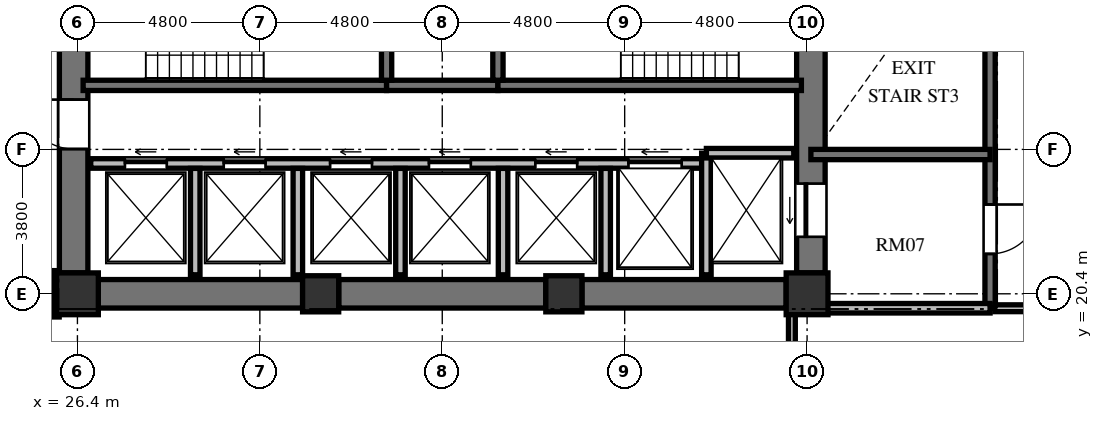
"""IFC4 building model, lengths in metres.
Left out: names, types, materials, properties, quantities, classifications, styles, units other than length and angle.
Written with IfcOpenShell. Run it as: python <this file> out.ifc"""

import sys

from ifc_helpers import new_model, si_unit, direction, frame, frame_2d, origin, origin_2d, place, context, subcontext, project, spatial, rectangle, extrude, element, fill, save


model = new_model("IFC4")
c1 = context("Model", 3, precision=1e-05, world=origin(), true_north=direction((0.0, 1.0)))
c2 = subcontext(c1, "Body", "Model", "MODEL_VIEW")
j1 = project(units=[si_unit("LENGTHUNIT", "METRE"), si_unit("PLANEANGLEUNIT", "RADIAN")], contexts=[c1])
p1 = place(None, origin())
s1 = spatial("IfcSite", under=j1, at=p1, CompositionType="ELEMENT")
p2 = place(p1, origin())
s2 = spatial("IfcBuilding", under=s1, at=p2, CompositionType="ELEMENT")
p3 = place(p2, frame((0.0, 0.0, 118.224)))
s3 = spatial("IfcBuildingStorey", under=s2, at=p3, CompositionType="ELEMENT", Elevation=118.224)
p4 = place(p3, frame((26.4, 20.4, 0.0), z_axis=(0.0, 0.0, 1.0), x_axis=(1.0, 0.0, 0.0)))
e1 = element("IfcColumn", 1, at=p4, inside=s3, PredefinedType="COLUMN", context=c2, shape_type="SweptSolid", body=[
    extrude(rectangle(XDim=1.1, YDim=1.1, at=origin_2d()), origin(), (0.0, 0.0, 1.0), 3.648),
])
for number, where, z_axis, x_axis in (
    (2, (32.8, 20.4, 0.0), (0.0, 0.0, 1.0), (1.0, 0.0, 0.0)),
    (3, (39.2, 20.4, 0.0), (0.0, 0.0, 1.0), (1.0, 0.0, 0.0)),
):
    element("IfcColumn", number, at=place(p3, frame(where, z_axis=z_axis, x_axis=x_axis)), inside=s3, PredefinedType="COLUMN", context=c2, shape_type="SweptSolid", body=[
        extrude(rectangle(XDim=0.95, YDim=0.95, at=origin_2d()), origin(), (0.0, 0.0, 1.0), 3.648),
    ])
p5 = place(p3, frame((45.6, 20.4, 0.0), z_axis=(0.0, 0.0, 1.0), x_axis=(1.0, 0.0, 0.0)))
e4 = element("IfcColumn", 4, at=p5, inside=s3, PredefinedType="COLUMN", context=c2, shape_type="SweptSolid", body=[
    extrude(rectangle(XDim=1.1, YDim=1.1, at=origin_2d()), origin(), (0.0, 0.0, 1.0), 3.648),
])
p6 = place(p3, frame((26.3, 20.95, 0.0), z_axis=(0.0, 0.0, 1.0), x_axis=(0.0, 1.0, 0.0)))
e5 = element("IfcWall", 5, at=p6, inside=s3, PredefinedType="SHEAR", context=c2, shape_type="SweptSolid", body=[
    extrude(rectangle(XDim=14.1, YDim=0.75, at=frame_2d((7.05, 0.0))), origin(), (0.0, 0.0, 1.0), 3.648),
])
p7 = place(p6, frame((6.5, 0.0, 0.0)))
e6 = element("IfcOpeningElement", 6, at=p7, cuts=e5, PredefinedType="OPENING", context=c2, shape_type="SweptSolid", body=[
    extrude(rectangle(XDim=1.2, YDim=2.15, at=frame_2d((0.6, 1.075))), frame((0.0, 0.385, 0.0), z_axis=(0.0, -1.0, 0.0), x_axis=(1.0, 0.0, 0.0)), (0.0, 0.0, 1.0), 0.77),
])
p8 = place(p6, frame((9.6, 0.0, 0.0)))
e7 = element("IfcOpeningElement", 7, at=p8, cuts=e5, PredefinedType="OPENING", context=c2, shape_type="SweptSolid", body=[
    extrude(rectangle(XDim=1.3, YDim=2.2, at=frame_2d((0.65, 1.1))), frame((0.0, 0.385, 0.0), z_axis=(0.0, -1.0, 0.0), x_axis=(1.0, 0.0, 0.0)), (0.0, 0.0, 1.0), 0.77),
])
p9 = place(p6, frame((3.26, 0.0, 0.0)))
e8 = element("IfcOpeningElement", 8, at=p9, cuts=e5, PredefinedType="OPENING", context=c2, shape_type="SweptSolid", body=[
    extrude(rectangle(XDim=1.3, YDim=2.2, at=frame_2d((0.65, 1.1))), frame((0.0, 0.385, 0.0), z_axis=(0.0, -1.0, 0.0), x_axis=(1.0, 0.0, 0.0)), (0.0, 0.0, 1.0), 0.77),
])
p10 = place(p3, frame((45.7, 20.95, 0.0), z_axis=(0.0, 0.0, 1.0), x_axis=(0.0, 1.0, 0.0)))
e9 = element("IfcWall", 9, at=p10, inside=s3, PredefinedType="SHEAR", context=c2, shape_type="SweptSolid", body=[
    extrude(rectangle(XDim=14.1, YDim=0.75, at=frame_2d((7.05, 0.0))), origin(), (0.0, 0.0, 1.0), 3.648),
])
p11 = place(p10, frame((11.75, 0.0, 0.0)))
e10 = element("IfcOpeningElement", 10, at=p11, cuts=e9, PredefinedType="OPENING", context=c2, shape_type="SweptSolid", body=[
    extrude(rectangle(XDim=1.4, YDim=2.3, at=frame_2d((0.7, 1.15))), frame((0.0, 0.385, 0.0), z_axis=(0.0, -1.0, 0.0), x_axis=(1.0, 0.0, 0.0)), (0.0, 0.0, 1.0), 0.77),
])
p12 = place(p10, frame((0.95, 0.0, 0.0)))
e11 = element("IfcOpeningElement", 11, at=p12, cuts=e9, PredefinedType="OPENING", context=c2, shape_type="SweptSolid", body=[
    extrude(rectangle(XDim=1.4, YDim=2.3, at=frame_2d((0.7, 1.15))), frame((0.0, 0.385, 0.0), z_axis=(0.0, -1.0, 0.0), x_axis=(1.0, 0.0, 0.0)), (0.0, 0.0, 1.0), 0.77),
])
p13 = place(p3, frame((26.95, 20.4, 0.0), z_axis=(0.0, 0.0, 1.0), x_axis=(1.0, 0.0, 0.0)))
e12 = element("IfcWall", 12, at=p13, inside=s3, PredefinedType="SHEAR", context=c2, shape_type="SweptSolid", body=[
    extrude(rectangle(XDim=5.375, YDim=0.75, at=frame_2d((2.688, 0.0))), origin(), (0.0, 0.0, 1.0), 3.648),
])
p14 = place(p3, frame((33.275, 20.4, 0.0), z_axis=(0.0, 0.0, 1.0), x_axis=(1.0, 0.0, 0.0)))
e13 = element("IfcWall", 13, at=p14, inside=s3, PredefinedType="SHEAR", context=c2, shape_type="SweptSolid", body=[
    extrude(rectangle(XDim=5.45, YDim=0.75, at=frame_2d((2.725, 0.0))), origin(), (0.0, 0.0, 1.0), 3.648),
])
p15 = place(p3, frame((39.675, 20.4, 0.0), z_axis=(0.0, 0.0, 1.0), x_axis=(1.0, 0.0, 0.0)))
e14 = element("IfcWall", 14, at=p15, inside=s3, PredefinedType="SHEAR", context=c2, shape_type="SweptSolid", body=[
    extrude(rectangle(XDim=5.375, YDim=0.75, at=frame_2d((2.688, 0.0))), origin(), (0.0, 0.0, 1.0), 3.648),
])
p16 = place(p3, frame((26.55, 25.885, 0.0), z_axis=(0.0, 0.0, 1.0), x_axis=(1.0, 0.0, 0.0)))
e15 = element("IfcWall", 15, at=p16, inside=s3, PredefinedType="SHEAR", context=c2, shape_type="SweptSolid", body=[
    extrude(rectangle(XDim=7.985, YDim=0.27, at=frame_2d((3.992, 0.0))), origin(), (0.0, 0.0, 1.0), 3.648),
])
p17 = place(p3, frame((34.535, 25.885, 0.0), z_axis=(0.0, 0.0, 1.0), x_axis=(1.0, 0.0, 0.0)))
e16 = element("IfcWall", 16, at=p17, inside=s3, PredefinedType="SHEAR", context=c2, shape_type="SweptSolid", body=[
    extrude(rectangle(XDim=2.93, YDim=0.27, at=frame_2d((1.465, 0.0))), origin(), (0.0, 0.0, 1.0), 3.648),
])
p18 = place(p3, frame((37.465, 25.885, 0.0), z_axis=(0.0, 0.0, 1.0), x_axis=(1.0, 0.0, 0.0)))
e17 = element("IfcWall", 17, at=p18, inside=s3, PredefinedType="SHEAR", context=c2, shape_type="SweptSolid", body=[
    extrude(rectangle(XDim=7.985, YDim=0.27, at=frame_2d((3.992, 0.0))), origin(), (0.0, 0.0, 1.0), 3.648),
])
for number, where, z_axis, x_axis in (
    (18, (34.535, 26.02, 0.0), (0.0, 0.0, 1.0), (0.0, 1.0, 0.0)),
    (19, (37.465, 26.02, 0.0), (0.0, 0.0, 1.0), (0.0, 1.0, 0.0)),
):
    element("IfcWall", number, at=place(p3, frame(where, z_axis=z_axis, x_axis=x_axis)), inside=s3, PredefinedType="SHEAR", context=c2, shape_type="SweptSolid", body=[
        extrude(rectangle(XDim=4.08, YDim=0.27, at=frame_2d((2.04, 0.0))), origin(), (0.0, 0.0, 1.0), 3.648),
    ])
p19 = place(p3, frame((26.75, 23.83, 0.0), z_axis=(0.0, 0.0, 1.0), x_axis=(1.0, 0.0, 0.0)))
e20 = element("IfcWall", 20, at=p19, inside=s3, PredefinedType="SOLIDWALL", context=c2, shape_type="SweptSolid", body=[
    extrude(rectangle(XDim=16.2, YDim=0.25, at=frame_2d((8.1, 0.0))), origin(), (0.0, 0.0, 1.0), 3.428),
])
p20 = place(p19, frame((0.9, 0.0, 0.0)))
e21 = element("IfcOpeningElement", 21, at=p20, cuts=e20, PredefinedType="OPENING", context=c2, shape_type="SweptSolid", body=[
    extrude(rectangle(XDim=1.1, YDim=2.2, at=frame_2d((0.55, 1.1))), frame((0.0, 0.135, 0.0), z_axis=(0.0, -1.0, 0.0), x_axis=(1.0, 0.0, 0.0)), (0.0, 0.0, 1.0), 0.27),
])
p21 = place(p19, frame((3.5, 0.0, 0.0)))
e22 = element("IfcOpeningElement", 22, at=p21, cuts=e20, PredefinedType="OPENING", context=c2, shape_type="SweptSolid", body=[
    extrude(rectangle(XDim=1.1, YDim=2.2, at=frame_2d((0.55, 1.1))), frame((0.0, 0.135, 0.0), z_axis=(0.0, -1.0, 0.0), x_axis=(1.0, 0.0, 0.0)), (0.0, 0.0, 1.0), 0.27),
])
p22 = place(p19, frame((6.3, 0.0, 0.0)))
e23 = element("IfcOpeningElement", 23, at=p22, cuts=e20, PredefinedType="OPENING", context=c2, shape_type="SweptSolid", body=[
    extrude(rectangle(XDim=1.1, YDim=2.2, at=frame_2d((0.55, 1.1))), frame((0.0, 0.135, 0.0), z_axis=(0.0, -1.0, 0.0), x_axis=(1.0, 0.0, 0.0)), (0.0, 0.0, 1.0), 0.27),
])
p23 = place(p19, frame((8.9, 0.0, 0.0)))
e24 = element("IfcOpeningElement", 24, at=p23, cuts=e20, PredefinedType="OPENING", context=c2, shape_type="SweptSolid", body=[
    extrude(rectangle(XDim=1.1, YDim=2.2, at=frame_2d((0.55, 1.1))), frame((0.0, 0.135, 0.0), z_axis=(0.0, -1.0, 0.0), x_axis=(1.0, 0.0, 0.0)), (0.0, 0.0, 1.0), 0.27),
])
p24 = place(p19, frame((11.7, 0.0, 0.0)))
e25 = element("IfcOpeningElement", 25, at=p24, cuts=e20, PredefinedType="OPENING", context=c2, shape_type="SweptSolid", body=[
    extrude(rectangle(XDim=1.1, YDim=2.2, at=frame_2d((0.55, 1.1))), frame((0.0, 0.135, 0.0), z_axis=(0.0, -1.0, 0.0), x_axis=(1.0, 0.0, 0.0)), (0.0, 0.0, 1.0), 0.27),
])
p25 = place(p19, frame((14.15, 0.0, 0.0)))
e26 = element("IfcOpeningElement", 26, at=p25, cuts=e20, PredefinedType="OPENING", context=c2, shape_type="SweptSolid", body=[
    extrude(rectangle(XDim=1.4, YDim=2.3, at=frame_2d((0.7, 1.15))), frame((0.0, 0.135, 0.0), z_axis=(0.0, -1.0, 0.0), x_axis=(1.0, 0.0, 0.0)), (0.0, 0.0, 1.0), 0.27),
])
p26 = place(p3, frame((42.95, 20.9, 0.0), z_axis=(0.0, 0.0, 1.0), x_axis=(0.0, 1.0, 0.0)))
e27 = element("IfcWall", 27, at=p26, inside=s3, PredefinedType="SOLIDWALL", context=c2, shape_type="SweptSolid", body=[
    extrude(rectangle(XDim=3.2, YDim=0.25, at=frame_2d((1.6, 0.0))), origin(), (0.0, 0.0, 1.0), 3.428),
])
p27 = place(p3, frame((42.95, 24.1, 0.0), z_axis=(0.0, 0.0, 1.0), x_axis=(1.0, 0.0, 0.0)))
e28 = element("IfcWall", 28, at=p27, inside=s3, PredefinedType="SOLIDWALL", context=c2, shape_type="SweptSolid", body=[
    extrude(rectangle(XDim=2.3, YDim=0.25, at=frame_2d((1.15, 0.0))), origin(), (0.0, 0.0, 1.0), 3.428),
])
for number, where, z_axis, x_axis in (
    (29, (29.5, 20.9, 0.0), (0.0, 0.0, 1.0), (0.0, 1.0, 0.0)),
    (30, (32.2, 20.9, 0.0), (0.0, 0.0, 1.0), (0.0, 1.0, 0.0)),
    (31, (34.9, 20.9, 0.0), (0.0, 0.0, 1.0), (0.0, 1.0, 0.0)),
    (32, (37.6, 20.9, 0.0), (0.0, 0.0, 1.0), (0.0, 1.0, 0.0)),
    (33, (40.3, 20.9, 0.0), (0.0, 0.0, 1.0), (0.0, 1.0, 0.0)),
):
    element("IfcWall", number, at=place(p3, frame(where, z_axis=z_axis, x_axis=x_axis)), inside=s3, PredefinedType="SOLIDWALL", context=c2, shape_type="SweptSolid", body=[
        extrude(rectangle(XDim=2.8, YDim=0.25, at=frame_2d((1.4, 0.0))), origin(), (0.0, 0.0, 1.0), 3.428),
    ])
p28 = place(p3, frame((50.415, 35.845, 0.0), z_axis=(0.0, 0.0, 1.0), x_axis=(0.0, -1.0, 0.0)))
e34 = element("IfcWall", 34, at=p28, inside=s3, PredefinedType="SHEAR", context=c2, shape_type="SweptSolid", body=[
    extrude(rectangle(XDim=15.825, YDim=0.27, at=frame_2d((7.913, 0.0))), origin(), (0.0, 0.0, 1.0), 3.648),
])
p29 = place(p28, frame((4.445, 0.0, 0.0)))
e35 = element("IfcOpeningElement", 35, at=p29, cuts=e34, PredefinedType="OPENING", context=c2, shape_type="SweptSolid", body=[
    extrude(rectangle(XDim=1.2, YDim=2.15, at=frame_2d((0.6, 1.075))), frame((0.0, 0.145, 0.0), z_axis=(0.0, -1.0, 0.0), x_axis=(1.0, 0.0, 0.0)), (0.0, 0.0, 1.0), 0.29),
])
p30 = place(p28, frame((1.295, 0.0, 0.0)))
e36 = element("IfcOpeningElement", 36, at=p30, cuts=e34, PredefinedType="OPENING", context=c2, shape_type="SweptSolid", body=[
    extrude(rectangle(XDim=1.3, YDim=2.2, at=frame_2d((0.65, 1.1))), frame((0.0, 0.145, 0.0), z_axis=(0.0, -1.0, 0.0), x_axis=(1.0, 0.0, 0.0)), (0.0, 0.0, 1.0), 0.29),
])
p31 = place(p28, frame((13.095, 0.0, 0.0)))
e37 = element("IfcOpeningElement", 37, at=p31, cuts=e34, PredefinedType="OPENING", context=c2, shape_type="SweptSolid", body=[
    extrude(rectangle(XDim=1.3, YDim=2.2, at=frame_2d((0.65, 1.1))), frame((0.0, 0.145, 0.0), z_axis=(0.0, -1.0, 0.0), x_axis=(1.0, 0.0, 0.0)), (0.0, 0.0, 1.0), 0.29),
])
p32 = place(p3, frame((45.7, 24.065, 0.0), z_axis=(0.0, 0.0, 1.0), x_axis=(1.0, 0.0, 0.0)))
e38 = element("IfcWall", 38, at=p32, inside=s3, PredefinedType="SHEAR", context=c2, shape_type="SweptSolid", body=[
    extrude(rectangle(XDim=4.715, YDim=0.27, at=frame_2d((2.357, 0.0))), origin(), (0.0, 0.0, 1.0), 3.648),
])
p33 = place(p3, frame((45.7, 20.02, 0.0), z_axis=(0.0, 0.0, 1.0), x_axis=(1.0, 0.0, 0.0)))
e39 = element("IfcWall", 39, at=p33, inside=s3, PredefinedType="SOLIDWALL", context=c2, shape_type="SweptSolid", body=[
    extrude(rectangle(XDim=4.715, YDim=0.25, at=frame_2d((2.357, 0.0))), origin(), (0.0, 0.0, 1.0), 3.428),
])
p34 = place(p3, frame((53.19, 20.02, 0.0), z_axis=(0.0, 0.0, 1.0), x_axis=(-1.0, 0.0, 0.0)))
e40 = element("IfcWall", 40, at=p34, inside=s3, PredefinedType="PARTITIONING", context=c2, shape_type="SweptSolid", body=[
    extrude(rectangle(XDim=2.65, YDim=0.18, at=frame_2d((1.325, 0.0))), origin(), (0.0, 0.0, 1.0), 3.428),
])
p35 = place(p3, frame((25.83, 21.01, 0.0), z_axis=(0.0, 0.0, 1.0), x_axis=(0.0, -1.0, 0.0)))
e41 = element("IfcWall", 41, at=p35, inside=s3, PredefinedType="PARTITIONING", context=c2, shape_type="SweptSolid", body=[
    extrude(rectangle(XDim=1.22, YDim=0.18, at=frame_2d((0.61, 0.0))), origin(), (0.0, 0.0, 1.0), 3.428),
])
p36 = place(p3, frame((45.2, 19.91, 0.0), z_axis=(0.0, 0.0, 1.0), x_axis=(0.0, -1.0, 0.0)))
e42 = element("IfcWall", 42, at=p36, inside=s3, PredefinedType="PARTITIONING", context=c2, shape_type="SweptSolid", body=[
    extrude(rectangle(XDim=2.55, YDim=0.18, at=frame_2d((1.275, 0.0))), origin(), (0.0, 0.0, 1.0), 3.428),
])
p37 = place(p9, origin())
e43 = element("IfcDoor", 43, at=p37, inside=s3, OperationType="SINGLE_SWING_RIGHT", PredefinedType="DOOR", context=c2, shape_type="SweptSolid", body=[
    extrude(rectangle(XDim=1.3, YDim=2.2, at=frame_2d((0.65, 1.1))), frame((0.0, 0.025, 0.0), z_axis=(0.0, -1.0, 0.0), x_axis=(1.0, 0.0, 0.0)), (0.0, 0.0, 1.0), 0.05),
])
fill(e8, e43)
p38 = place(p20, origin())
e44 = element("IfcDoor", 44, at=p38, inside=s3, OperationType="SLIDING_TO_LEFT", PredefinedType="DOOR", context=c2, shape_type="SweptSolid", body=[
    extrude(rectangle(XDim=1.1, YDim=2.2, at=frame_2d((0.55, 1.1))), frame((0.0, 0.025, 0.0), z_axis=(0.0, -1.0, 0.0), x_axis=(1.0, 0.0, 0.0)), (0.0, 0.0, 1.0), 0.05),
])
fill(e21, e44)
p39 = place(p21, origin())
e45 = element("IfcDoor", 45, at=p39, inside=s3, OperationType="SLIDING_TO_LEFT", PredefinedType="DOOR", context=c2, shape_type="SweptSolid", body=[
    extrude(rectangle(XDim=1.1, YDim=2.2, at=frame_2d((0.55, 1.1))), frame((0.0, 0.025, 0.0), z_axis=(0.0, -1.0, 0.0), x_axis=(1.0, 0.0, 0.0)), (0.0, 0.0, 1.0), 0.05),
])
fill(e22, e45)
p40 = place(p22, origin())
e46 = element("IfcDoor", 46, at=p40, inside=s3, OperationType="SLIDING_TO_LEFT", PredefinedType="DOOR", context=c2, shape_type="SweptSolid", body=[
    extrude(rectangle(XDim=1.1, YDim=2.2, at=frame_2d((0.55, 1.1))), frame((0.0, 0.025, 0.0), z_axis=(0.0, -1.0, 0.0), x_axis=(1.0, 0.0, 0.0)), (0.0, 0.0, 1.0), 0.05),
])
fill(e23, e46)
p41 = place(p23, origin())
e47 = element("IfcDoor", 47, at=p41, inside=s3, OperationType="SLIDING_TO_LEFT", PredefinedType="DOOR", context=c2, shape_type="SweptSolid", body=[
    extrude(rectangle(XDim=1.1, YDim=2.2, at=frame_2d((0.55, 1.1))), frame((0.0, 0.025, 0.0), z_axis=(0.0, -1.0, 0.0), x_axis=(1.0, 0.0, 0.0)), (0.0, 0.0, 1.0), 0.05),
])
fill(e24, e47)
p42 = place(p24, origin())
e48 = element("IfcDoor", 48, at=p42, inside=s3, OperationType="SLIDING_TO_LEFT", PredefinedType="DOOR", context=c2, shape_type="SweptSolid", body=[
    extrude(rectangle(XDim=1.1, YDim=2.2, at=frame_2d((0.55, 1.1))), frame((0.0, 0.025, 0.0), z_axis=(0.0, -1.0, 0.0), x_axis=(1.0, 0.0, 0.0)), (0.0, 0.0, 1.0), 0.05),
])
fill(e25, e48)
p43 = place(p12, origin())
e49 = element("IfcDoor", 49, at=p43, inside=s3, OperationType="SLIDING_TO_LEFT", PredefinedType="DOOR", context=c2, shape_type="SweptSolid", body=[
    extrude(rectangle(XDim=1.4, YDim=2.3, at=frame_2d((0.7, 1.15))), frame((0.0, 0.025, 0.0), z_axis=(0.0, -1.0, 0.0), x_axis=(1.0, 0.0, 0.0)), (0.0, 0.0, 1.0), 0.05),
])
fill(e11, e49)
p44 = place(p25, origin())
e50 = element("IfcDoor", 50, at=p44, inside=s3, OperationType="SLIDING_TO_LEFT", PredefinedType="DOOR", context=c2, shape_type="SweptSolid", body=[
    extrude(rectangle(XDim=1.4, YDim=2.3, at=frame_2d((0.7, 1.15))), frame((0.0, 0.025, 0.0), z_axis=(0.0, -1.0, 0.0), x_axis=(1.0, 0.0, 0.0)), (0.0, 0.0, 1.0), 0.05),
])
fill(e26, e50)
p45 = place(p31, origin())
e51 = element("IfcDoor", 51, at=p45, inside=s3, OperationType="SINGLE_SWING_LEFT", PredefinedType="DOOR", context=c2, shape_type="SweptSolid", body=[
    extrude(rectangle(XDim=1.3, YDim=2.2, at=frame_2d((0.65, 1.1))), frame((0.0, 0.025, 0.0), z_axis=(0.0, -1.0, 0.0), x_axis=(1.0, 0.0, 0.0)), (0.0, 0.0, 1.0), 0.05),
])
fill(e37, e51)
save(model, sys.argv[1])
